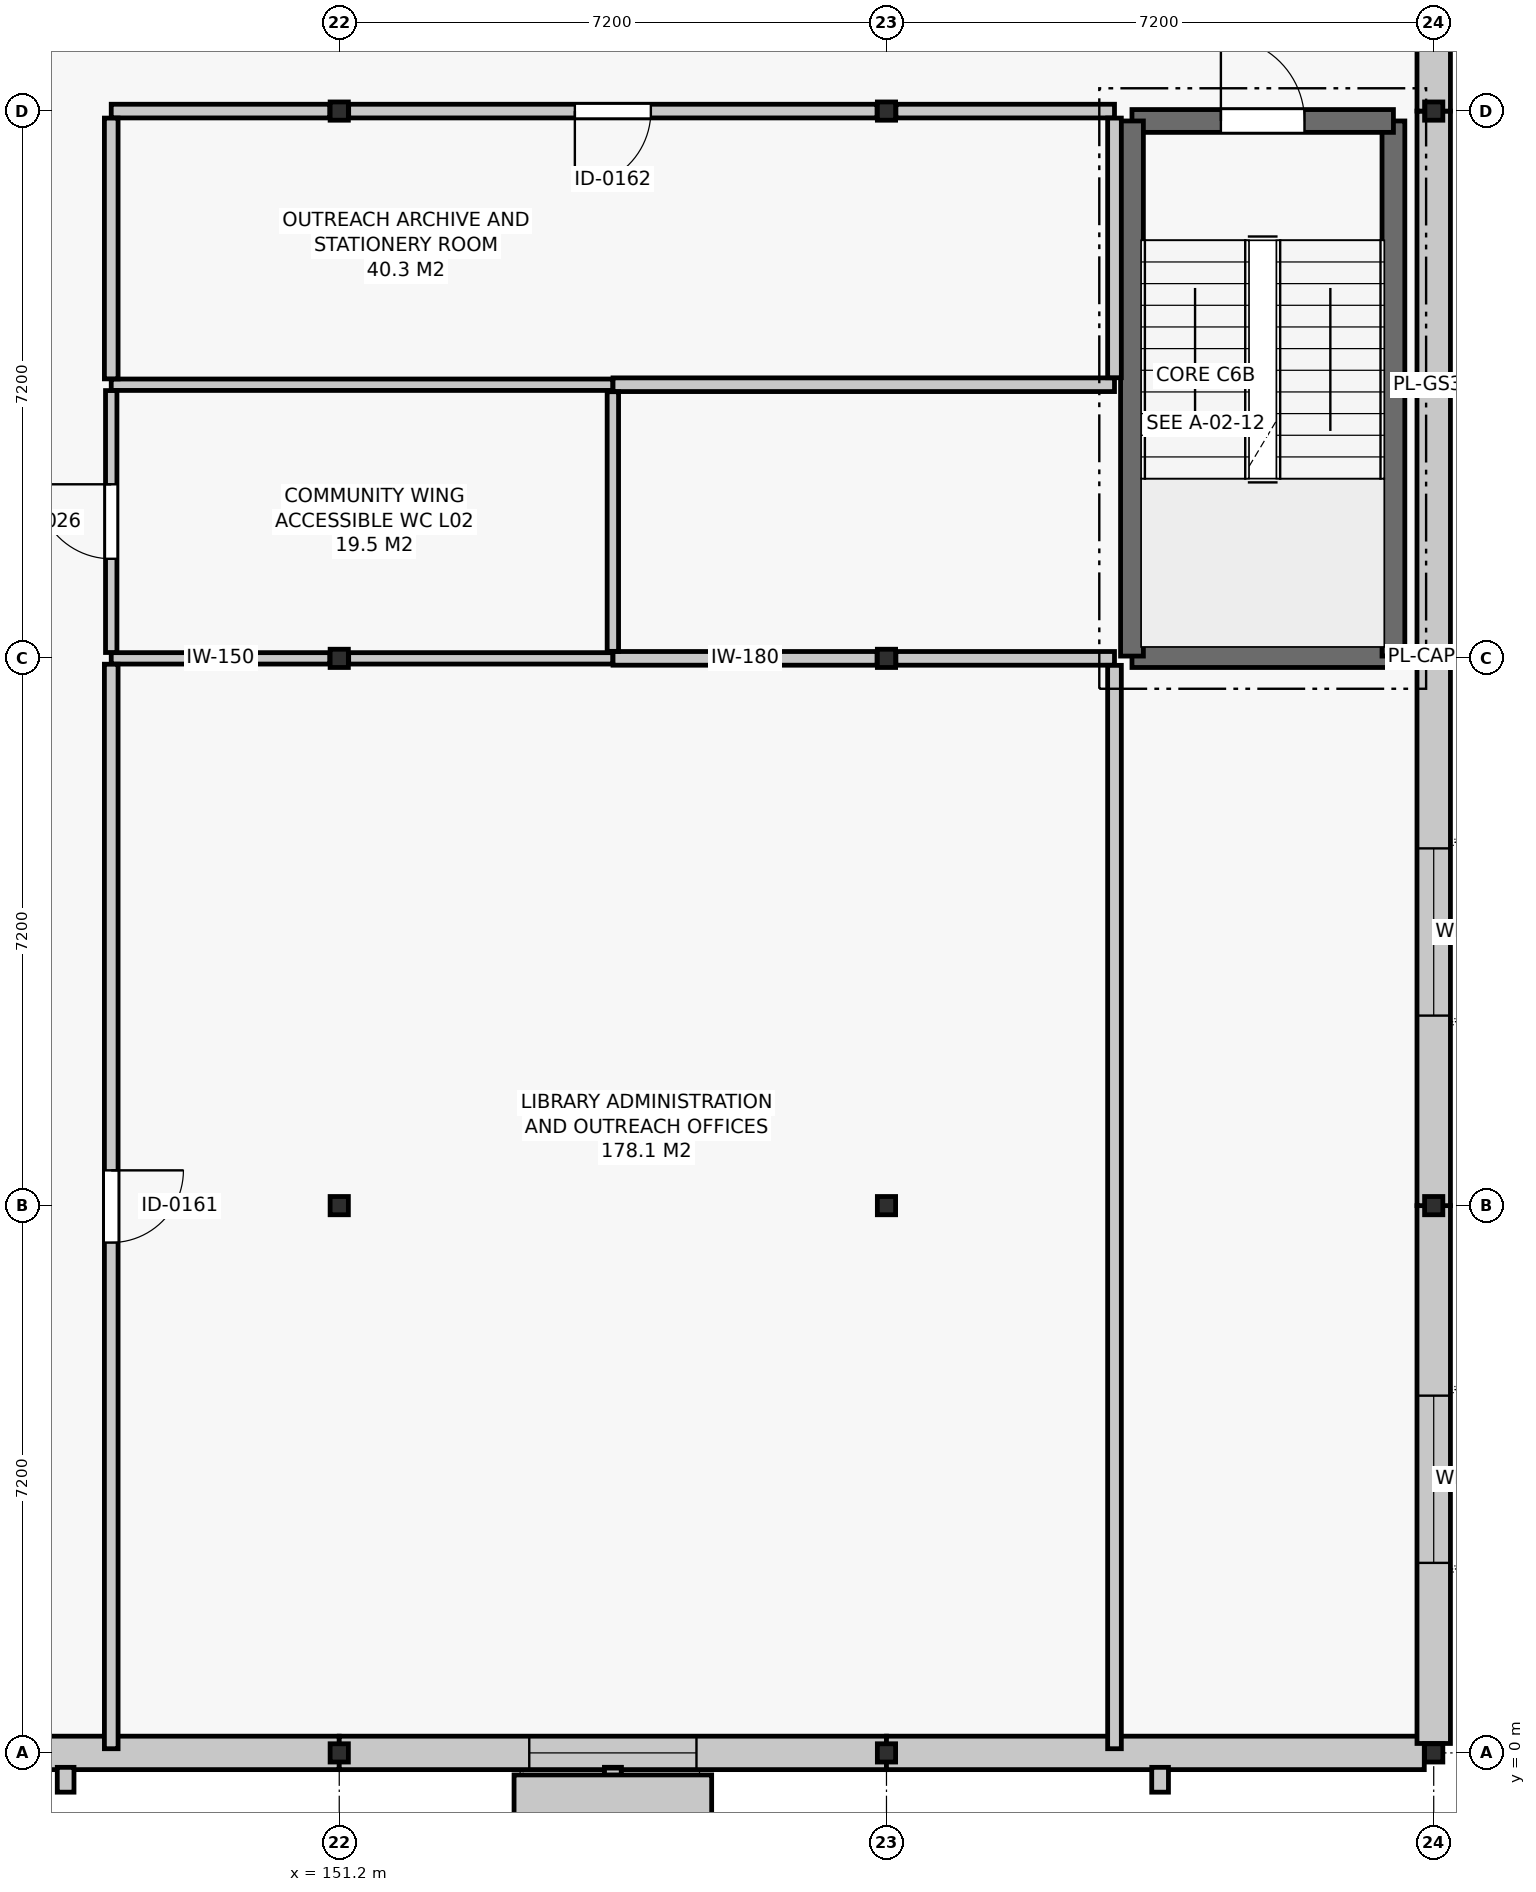
"""IFC4 building model, lengths in metres.
Left out: names, types, materials, properties, quantities, classifications, styles, units other than length and angle.
Written with IfcOpenShell. Run it as: python <this file> out.ifc"""

import sys

from ifc_helpers import new_model, si_unit, direction, frame, frame_2d, origin, origin_2d, place, context, subcontext, project, spatial, rectangle, i_section, extrude, element, fill, save


model = new_model("IFC4")
c1 = context("Model", 3, precision=1e-05, world=origin(), true_north=direction((0.0, 1.0)))
c2 = subcontext(c1, "Body", "Model", "MODEL_VIEW")
j1 = project(units=[si_unit("LENGTHUNIT", "METRE"), si_unit("PLANEANGLEUNIT", "RADIAN")], contexts=[c1])
p1 = place(None, origin())
s1 = spatial("IfcSite", under=j1, at=p1, CompositionType="ELEMENT")
p2 = place(p1, origin())
s2 = spatial("IfcBuilding", under=s1, at=p2, CompositionType="ELEMENT")
p3 = place(p2, frame((0.0, 0.0, 10.2)))
s3 = spatial("IfcBuildingStorey", under=s2, at=p3, CompositionType="ELEMENT", Elevation=10.2)
for number, where, z_axis, x_axis in (
    (1, (151.2, 0.0, 0.0), (0.0, 0.0, 1.0), (1.0, 0.0, 0.0)),
    (2, (151.2, 7.2, 0.0), (0.0, 0.0, 1.0), (1.0, 0.0, 0.0)),
    (3, (151.2, 14.4, 0.0), (0.0, 0.0, 1.0), (1.0, 0.0, 0.0)),
    (4, (151.2, 21.6, 0.0), (0.0, 0.0, 1.0), (1.0, 0.0, 0.0)),
    (5, (158.4, 0.0, 0.0), (0.0, 0.0, 1.0), (1.0, 0.0, 0.0)),
    (6, (158.4, 7.2, 0.0), (0.0, 0.0, 1.0), (1.0, 0.0, 0.0)),
    (7, (158.4, 14.4, 0.0), (0.0, 0.0, 1.0), (1.0, 0.0, 0.0)),
    (8, (158.4, 21.6, 0.0), (0.0, 0.0, 1.0), (1.0, 0.0, 0.0)),
    (9, (165.6, 0.0, 0.0), (0.0, 0.0, 1.0), (1.0, 0.0, 0.0)),
    (10, (165.6, 7.2, 0.0), (0.0, 0.0, 1.0), (1.0, 0.0, 0.0)),
    (11, (165.6, 14.4, 0.0), (0.0, 0.0, 1.0), (1.0, 0.0, 0.0)),
    (12, (165.6, 21.6, 0.0), (0.0, 0.0, 1.0), (1.0, 0.0, 0.0)),
):
    element("IfcColumn", number, at=place(p3, frame(where, z_axis=z_axis, x_axis=x_axis)), inside=s3, PredefinedType="COLUMN", context=c2, shape_type="SweptSolid", body=[
        extrude(i_section(OverallWidth=0.24, OverallDepth=0.24, WebThickness=0.01, FlangeThickness=0.017, FilletRadius=0.021, at=origin_2d()), origin(), (0.0, 0.0, 1.0), 4.2),
    ])
p4 = place(p3, frame((144.0, 0.0, 0.0), z_axis=(0.0, 0.0, 1.0), x_axis=(1.0, 0.0, 0.0)))
e13 = element("IfcWall", 13, at=p4, inside=s3, PredefinedType="SOLIDWALL", context=c2, shape_type="SweptSolid", body=[
    extrude(rectangle(XDim=7.2, YDim=0.44, at=frame_2d((3.6, 0.0))), origin(), (0.0, 0.0, 1.0), 3.2),
])
p5 = place(p3, frame((151.2, 0.0, 0.0), z_axis=(0.0, 0.0, 1.0), x_axis=(1.0, 0.0, 0.0)))
e14 = element("IfcWall", 14, at=p5, inside=s3, PredefinedType="SOLIDWALL", context=c2, shape_type="SweptSolid", body=[
    extrude(rectangle(XDim=7.2, YDim=0.44, at=frame_2d((3.6, 0.0))), origin(), (0.0, 0.0, 1.0), 3.2),
])
p6 = place(p5, frame((2.5, 0.0, 0.87)))
e15 = element("IfcOpeningElement", 15, at=p6, cuts=e14, PredefinedType="OPENING", context=c2, shape_type="SweptSolid", body=[
    extrude(rectangle(XDim=2.2, YDim=2.25, at=frame_2d((1.1, 1.125))), frame((0.0, 0.232, 0.0), z_axis=(0.0, -1.0, 0.0), x_axis=(1.0, 0.0, 0.0)), (0.0, 0.0, 1.0), 0.464),
])
p7 = place(p3, frame((158.4, 0.0, 0.0), z_axis=(0.0, 0.0, 1.0), x_axis=(1.0, 0.0, 0.0)))
e16 = element("IfcWall", 16, at=p7, inside=s3, PredefinedType="SOLIDWALL", context=c2, shape_type="SweptSolid", body=[
    extrude(rectangle(XDim=7.076, YDim=0.44, at=frame_2d((3.538, 0.0))), origin(), (0.0, 0.0, 1.0), 3.2),
])
p8 = place(p3, frame((165.6, 0.124, 0.0), z_axis=(0.0, 0.0, 1.0), x_axis=(0.0, 1.0, 0.0)))
e17 = element("IfcWall", 17, at=p8, inside=s3, PredefinedType="SOLIDWALL", context=c2, shape_type="SweptSolid", body=[
    extrude(rectangle(XDim=7.076, YDim=0.44, at=frame_2d((3.538, 0.0))), origin(), (0.0, 0.0, 1.0), 3.2),
])
p9 = place(p8, frame((2.376, 0.0, 0.87)))
e18 = element("IfcOpeningElement", 18, at=p9, cuts=e17, PredefinedType="OPENING", context=c2, shape_type="SweptSolid", body=[
    extrude(rectangle(XDim=2.2, YDim=2.25, at=frame_2d((1.1, 1.125))), frame((0.0, 0.232, 0.0), z_axis=(0.0, -1.0, 0.0), x_axis=(1.0, 0.0, 0.0)), (0.0, 0.0, 1.0), 0.464),
])
p10 = place(p3, frame((165.6, 7.2, 0.0), z_axis=(0.0, 0.0, 1.0), x_axis=(0.0, 1.0, 0.0)))
e19 = element("IfcWall", 19, at=p10, inside=s3, PredefinedType="SOLIDWALL", context=c2, shape_type="SweptSolid", body=[
    extrude(rectangle(XDim=7.2, YDim=0.44, at=frame_2d((3.6, 0.0))), origin(), (0.0, 0.0, 1.0), 3.2),
])
p11 = place(p10, frame((2.5, 0.0, 0.87)))
e20 = element("IfcOpeningElement", 20, at=p11, cuts=e19, PredefinedType="OPENING", context=c2, shape_type="SweptSolid", body=[
    extrude(rectangle(XDim=2.2, YDim=2.25, at=frame_2d((1.1, 1.125))), frame((0.0, 0.232, 0.0), z_axis=(0.0, -1.0, 0.0), x_axis=(1.0, 0.0, 0.0)), (0.0, 0.0, 1.0), 0.464),
])
p12 = place(p3, frame((165.6, 14.4, 0.0), z_axis=(0.0, 0.0, 1.0), x_axis=(0.0, 1.0, 0.0)))
e21 = element("IfcWall", 21, at=p12, inside=s3, PredefinedType="SOLIDWALL", context=c2, shape_type="SweptSolid", body=[
    extrude(rectangle(XDim=7.2, YDim=0.44, at=frame_2d((3.6, 0.0))), origin(), (0.0, 0.0, 1.0), 3.2),
])
p13 = place(p3, frame((165.6, 21.6, 0.0), z_axis=(0.0, 0.0, 1.0), x_axis=(0.0, 1.0, 0.0)))
e22 = element("IfcWall", 22, at=p13, inside=s3, PredefinedType="SOLIDWALL", context=c2, shape_type="SweptSolid", body=[
    extrude(rectangle(XDim=7.076, YDim=0.44, at=frame_2d((3.538, 0.0))), origin(), (0.0, 0.0, 1.0), 3.2),
])
p14 = place(p13, frame((2.5, 0.0, 0.87)))
e23 = element("IfcOpeningElement", 23, at=p14, cuts=e22, PredefinedType="OPENING", context=c2, shape_type="SweptSolid", body=[
    extrude(rectangle(XDim=2.2, YDim=2.25, at=frame_2d((1.1, 1.125))), frame((0.0, 0.232, 0.0), z_axis=(0.0, -1.0, 0.0), x_axis=(1.0, 0.0, 0.0)), (0.0, 0.0, 1.0), 0.464),
])
p15 = place(p3, frame((161.63, 14.43, 0.0), z_axis=(0.0, 0.0, 1.0), x_axis=(1.0, 0.0, 0.0)))
e24 = element("IfcWall", 24, at=p15, inside=s3, PredefinedType="SHEAR", context=c2, shape_type="SweptSolid", body=[
    extrude(rectangle(XDim=3.44, YDim=0.3, at=frame_2d((1.72, 0.0))), origin(), (0.0, 0.0, 1.0), 3.92),
])
p16 = place(p3, frame((165.07, 14.43, 0.0), z_axis=(0.0, 0.0, 1.0), x_axis=(0.0, 1.0, 0.0)))
e25 = element("IfcWall", 25, at=p16, inside=s3, PredefinedType="SHEAR", context=c2, shape_type="SweptSolid", body=[
    extrude(rectangle(XDim=7.04, YDim=0.3, at=frame_2d((3.52, 0.0))), origin(), (0.0, 0.0, 1.0), 3.92),
])
p17 = place(p3, frame((165.07, 21.47, 0.0), z_axis=(0.0, 0.0, 1.0), x_axis=(-1.0, 0.0, 0.0)))
e26 = element("IfcWall", 26, at=p17, inside=s3, PredefinedType="SHEAR", context=c2, shape_type="SweptSolid", body=[
    extrude(rectangle(XDim=3.44, YDim=0.3, at=frame_2d((1.72, 0.0))), origin(), (0.0, 0.0, 1.0), 3.92),
])
p18 = place(p17, frame((1.17, 0.0, 0.0)))
e27 = element("IfcOpeningElement", 27, at=p18, cuts=e26, PredefinedType="OPENING", context=c2, shape_type="SweptSolid", body=[
    extrude(rectangle(XDim=1.1, YDim=2.15, at=frame_2d((0.55, 1.075))), frame((0.0, 0.162, 0.0), z_axis=(0.0, -1.0, 0.0), x_axis=(1.0, 0.0, 0.0)), (0.0, 0.0, 1.0), 0.324),
])
p19 = place(p3, frame((161.63, 21.47, 0.0), z_axis=(0.0, 0.0, 1.0), x_axis=(0.0, -1.0, 0.0)))
e28 = element("IfcWall", 28, at=p19, inside=s3, PredefinedType="SHEAR", context=c2, shape_type="SweptSolid", body=[
    extrude(rectangle(XDim=7.04, YDim=0.3, at=frame_2d((3.52, 0.0))), origin(), (0.0, 0.0, 1.0), 3.92),
])
p20 = place(p3, frame((148.2, 14.4, 0.0), z_axis=(0.0, 0.0, 1.0), x_axis=(1.0, 0.0, 0.0)))
e29 = element("IfcWall", 29, at=p20, inside=s3, PredefinedType="PARTITIONING", context=c2, shape_type="SweptSolid", body=[
    extrude(rectangle(XDim=2.876, YDim=0.15, at=frame_2d((1.438, 0.0))), origin(), (0.0, 0.0, 1.0), 3.515),
])
p21 = place(p3, frame((151.324, 14.4, 0.0), z_axis=(0.0, 0.0, 1.0), x_axis=(1.0, 0.0, 0.0)))
e30 = element("IfcWall", 30, at=p21, inside=s3, PredefinedType="PARTITIONING", context=c2, shape_type="SweptSolid", body=[
    extrude(rectangle(XDim=3.476, YDim=0.15, at=frame_2d((1.738, 0.0))), origin(), (0.0, 0.0, 1.0), 3.515),
])
p22 = place(p3, frame((148.2, 18.0, 0.0), z_axis=(0.0, 0.0, 1.0), x_axis=(1.0, 0.0, 0.0)))
e31 = element("IfcWall", 31, at=p22, inside=s3, PredefinedType="PARTITIONING", context=c2, shape_type="SweptSolid", body=[
    extrude(rectangle(XDim=6.6, YDim=0.15, at=frame_2d((3.3, 0.0))), origin(), (0.0, 0.0, 1.0), 3.555),
])
p23 = place(p3, frame((154.802, 14.4, 0.0), z_axis=(0.0, 0.0, 1.0), x_axis=(1.0, 0.0, 0.0)))
e32 = element("IfcWall", 32, at=p23, inside=s3, PredefinedType="PARTITIONING", context=c2, shape_type="SweptSolid", body=[
    extrude(rectangle(XDim=3.474, YDim=0.18, at=frame_2d((1.737, 0.0))), origin(), (0.0, 0.0, 1.0), 3.515),
])
p24 = place(p3, frame((158.524, 14.4, 0.0), z_axis=(0.0, 0.0, 1.0), x_axis=(1.0, 0.0, 0.0)))
e33 = element("IfcWall", 33, at=p24, inside=s3, PredefinedType="PARTITIONING", context=c2, shape_type="SweptSolid", body=[
    extrude(rectangle(XDim=2.876, YDim=0.18, at=frame_2d((1.438, 0.0))), origin(), (0.0, 0.0, 1.0), 3.515),
])
p25 = place(p3, frame((154.802, 18.0, 0.0), z_axis=(0.0, 0.0, 1.0), x_axis=(1.0, 0.0, 0.0)))
e34 = element("IfcWall", 34, at=p25, inside=s3, PredefinedType="PARTITIONING", context=c2, shape_type="SweptSolid", body=[
    extrude(rectangle(XDim=6.598, YDim=0.18, at=frame_2d((3.299, 0.0))), origin(), (0.0, 0.0, 1.0), 3.555),
])
p26 = place(p3, frame((148.2, 21.6, 0.0), z_axis=(0.0, 0.0, 1.0), x_axis=(1.0, 0.0, 0.0)))
e35 = element("IfcWall", 35, at=p26, inside=s3, PredefinedType="PARTITIONING", context=c2, shape_type="SweptSolid", body=[
    extrude(rectangle(XDim=2.876, YDim=0.18, at=frame_2d((1.438, 0.0))), origin(), (0.0, 0.0, 1.0), 3.515),
])
p27 = place(p3, frame((151.324, 21.6, 0.0), z_axis=(0.0, 0.0, 1.0), x_axis=(1.0, 0.0, 0.0)))
e36 = element("IfcWall", 36, at=p27, inside=s3, PredefinedType="PARTITIONING", context=c2, shape_type="SweptSolid", body=[
    extrude(rectangle(XDim=6.952, YDim=0.18, at=frame_2d((3.476, 0.0))), origin(), (0.0, 0.0, 1.0), 3.515),
])
p28 = place(p27, frame((2.976, 0.0, 0.0)))
e37 = element("IfcOpeningElement", 37, at=p28, cuts=e36, PredefinedType="OPENING", context=c2, shape_type="SweptSolid", body=[
    extrude(rectangle(XDim=1.0, YDim=2.15, at=frame_2d((0.5, 1.075))), frame((0.0, 0.102, 0.0), z_axis=(0.0, -1.0, 0.0), x_axis=(1.0, 0.0, 0.0)), (0.0, 0.0, 1.0), 0.204),
])
p29 = place(p3, frame((158.524, 21.6, 0.0), z_axis=(0.0, 0.0, 1.0), x_axis=(1.0, 0.0, 0.0)))
e38 = element("IfcWall", 38, at=p29, inside=s3, PredefinedType="PARTITIONING", context=c2, shape_type="SweptSolid", body=[
    extrude(rectangle(XDim=2.876, YDim=0.18, at=frame_2d((1.438, 0.0))), origin(), (0.0, 0.0, 1.0), 3.515),
])
p30 = place(p3, frame((148.2, 14.477, 0.0), z_axis=(0.0, 0.0, 1.0), x_axis=(0.0, 1.0, 0.0)))
e39 = element("IfcWall", 39, at=p30, inside=s3, PredefinedType="PARTITIONING", context=c2, shape_type="SweptSolid", body=[
    extrude(rectangle(XDim=3.446, YDim=0.15, at=frame_2d((1.723, 0.0))), origin(), (0.0, 0.0, 1.0), 3.515),
])
p31 = place(p30, frame((1.233, 0.0, 0.0)))
e40 = element("IfcOpeningElement", 40, at=p31, cuts=e39, PredefinedType="OPENING", context=c2, shape_type="SweptSolid", body=[
    extrude(rectangle(XDim=0.98, YDim=2.1, at=frame_2d((0.49, 1.05))), frame((0.0, 0.087, 0.0), z_axis=(0.0, -1.0, 0.0), x_axis=(1.0, 0.0, 0.0)), (0.0, 0.0, 1.0), 0.174),
])
p32 = place(p3, frame((154.8, 14.492, 0.0), z_axis=(0.0, 0.0, 1.0), x_axis=(0.0, 1.0, 0.0)))
e41 = element("IfcWall", 41, at=p32, inside=s3, PredefinedType="PARTITIONING", context=c2, shape_type="SweptSolid", body=[
    extrude(rectangle(XDim=3.416, YDim=0.15, at=frame_2d((1.708, 0.0))), origin(), (0.0, 0.0, 1.0), 3.515),
])
p33 = place(p3, frame((148.2, 0.055, 0.0), z_axis=(0.0, 0.0, 1.0), x_axis=(0.0, 1.0, 0.0)))
e42 = element("IfcWall", 42, at=p33, inside=s3, PredefinedType="PARTITIONING", context=c2, shape_type="SweptSolid", body=[
    extrude(rectangle(XDim=14.268, YDim=0.18, at=frame_2d((7.134, 0.0))), origin(), (0.0, 0.0, 1.0), 3.355),
])
p34 = place(p33, frame((6.659, 0.0, 0.0)))
e43 = element("IfcOpeningElement", 43, at=p34, cuts=e42, PredefinedType="OPENING", context=c2, shape_type="SweptSolid", body=[
    extrude(rectangle(XDim=0.95, YDim=2.15, at=frame_2d((0.475, 1.075))), frame((0.0, 0.102, 0.0), z_axis=(0.0, -1.0, 0.0), x_axis=(1.0, 0.0, 0.0)), (0.0, 0.0, 1.0), 0.204),
])
p35 = place(p3, frame((161.4, 0.055, 0.0), z_axis=(0.0, 0.0, 1.0), x_axis=(0.0, 1.0, 0.0)))
e44 = element("IfcWall", 44, at=p35, inside=s3, PredefinedType="PARTITIONING", context=c2, shape_type="SweptSolid", body=[
    extrude(rectangle(XDim=14.253, YDim=0.18, at=frame_2d((7.126, 0.0))), origin(), (0.0, 0.0, 1.0), 3.355),
])
p36 = place(p3, frame((148.2, 18.077, 0.0), z_axis=(0.0, 0.0, 1.0), x_axis=(0.0, 1.0, 0.0)))
e45 = element("IfcWall", 45, at=p36, inside=s3, PredefinedType="PARTITIONING", context=c2, shape_type="SweptSolid", body=[
    extrude(rectangle(XDim=3.431, YDim=0.18, at=frame_2d((1.716, 0.0))), origin(), (0.0, 0.0, 1.0), 3.515),
])
p37 = place(p3, frame((161.4, 18.092, 0.0), z_axis=(0.0, 0.0, 1.0), x_axis=(0.0, 1.0, 0.0)))
e46 = element("IfcWall", 46, at=p37, inside=s3, PredefinedType="PARTITIONING", context=c2, shape_type="SweptSolid", body=[
    extrude(rectangle(XDim=3.416, YDim=0.18, at=frame_2d((1.708, 0.0))), origin(), (0.0, 0.0, 1.0), 3.515),
])
p38 = place(p6, origin())
e47 = element("IfcWindow", 47, at=p38, inside=s3, PartitioningType="SINGLE_PANEL", PredefinedType="WINDOW", context=c2, shape_type="SweptSolid", body=[
    extrude(rectangle(XDim=2.2, YDim=2.25, at=frame_2d((1.1, 1.125))), frame((0.0, 0.03, 0.0), z_axis=(0.0, -1.0, 0.0), x_axis=(1.0, 0.0, 0.0)), (0.0, 0.0, 1.0), 0.06),
])
fill(e15, e47)
p39 = place(p9, origin())
e48 = element("IfcWindow", 48, at=p39, inside=s3, PartitioningType="SINGLE_PANEL", PredefinedType="WINDOW", context=c2, shape_type="SweptSolid", body=[
    extrude(rectangle(XDim=2.2, YDim=2.25, at=frame_2d((1.1, 1.125))), frame((0.0, 0.03, 0.0), z_axis=(0.0, -1.0, 0.0), x_axis=(1.0, 0.0, 0.0)), (0.0, 0.0, 1.0), 0.06),
])
fill(e18, e48)
p40 = place(p11, origin())
e49 = element("IfcWindow", 49, at=p40, inside=s3, PartitioningType="SINGLE_PANEL", PredefinedType="WINDOW", context=c2, shape_type="SweptSolid", body=[
    extrude(rectangle(XDim=2.2, YDim=2.25, at=frame_2d((1.1, 1.125))), frame((0.0, 0.03, 0.0), z_axis=(0.0, -1.0, 0.0), x_axis=(1.0, 0.0, 0.0)), (0.0, 0.0, 1.0), 0.06),
])
fill(e20, e49)
p41 = place(p18, frame((1.1, 0.0, 0.0), z_axis=(0.0, 0.0, 1.0), x_axis=(-1.0, 0.0, 0.0)))
e50 = element("IfcDoor", 50, at=p41, inside=s3, OperationType="SINGLE_SWING_LEFT", PredefinedType="DOOR", context=c2, shape_type="SweptSolid", body=[
    extrude(rectangle(XDim=1.1, YDim=2.15, at=frame_2d((0.55, 1.075))), frame((0.0, 0.025, 0.0), z_axis=(0.0, -1.0, 0.0), x_axis=(1.0, 0.0, 0.0)), (0.0, 0.0, 1.0), 0.05),
])
fill(e27, e50)
p42 = place(p31, origin())
e51 = element("IfcDoor", 51, at=p42, inside=s3, OperationType="SINGLE_SWING_RIGHT", PredefinedType="DOOR", context=c2, shape_type="SweptSolid", body=[
    extrude(rectangle(XDim=0.98, YDim=2.1, at=frame_2d((0.49, 1.05))), frame((0.0, 0.025, 0.0), z_axis=(0.0, -1.0, 0.0), x_axis=(1.0, 0.0, 0.0)), (0.0, 0.0, 1.0), 0.05),
])
fill(e40, e51)
p43 = place(p34, frame((0.95, 0.0, 0.0), z_axis=(0.0, 0.0, 1.0), x_axis=(-1.0, 0.0, 0.0)))
e52 = element("IfcDoor", 52, at=p43, inside=s3, OperationType="SINGLE_SWING_LEFT", PredefinedType="DOOR", context=c2, shape_type="SweptSolid", body=[
    extrude(rectangle(XDim=0.95, YDim=2.15, at=frame_2d((0.475, 1.075))), frame((0.0, 0.025, 0.0), z_axis=(0.0, -1.0, 0.0), x_axis=(1.0, 0.0, 0.0)), (0.0, 0.0, 1.0), 0.05),
])
fill(e43, e52)
p44 = place(p28, frame((1.0, 0.0, 0.0), z_axis=(0.0, 0.0, 1.0), x_axis=(-1.0, 0.0, 0.0)))
e53 = element("IfcDoor", 53, at=p44, inside=s3, OperationType="SINGLE_SWING_RIGHT", PredefinedType="DOOR", context=c2, shape_type="SweptSolid", body=[
    extrude(rectangle(XDim=1.0, YDim=2.15, at=frame_2d((0.5, 1.075))), frame((0.0, 0.025, 0.0), z_axis=(0.0, -1.0, 0.0), x_axis=(1.0, 0.0, 0.0)), (0.0, 0.0, 1.0), 0.05),
])
fill(e37, e53)
save(model, sys.argv[1])
